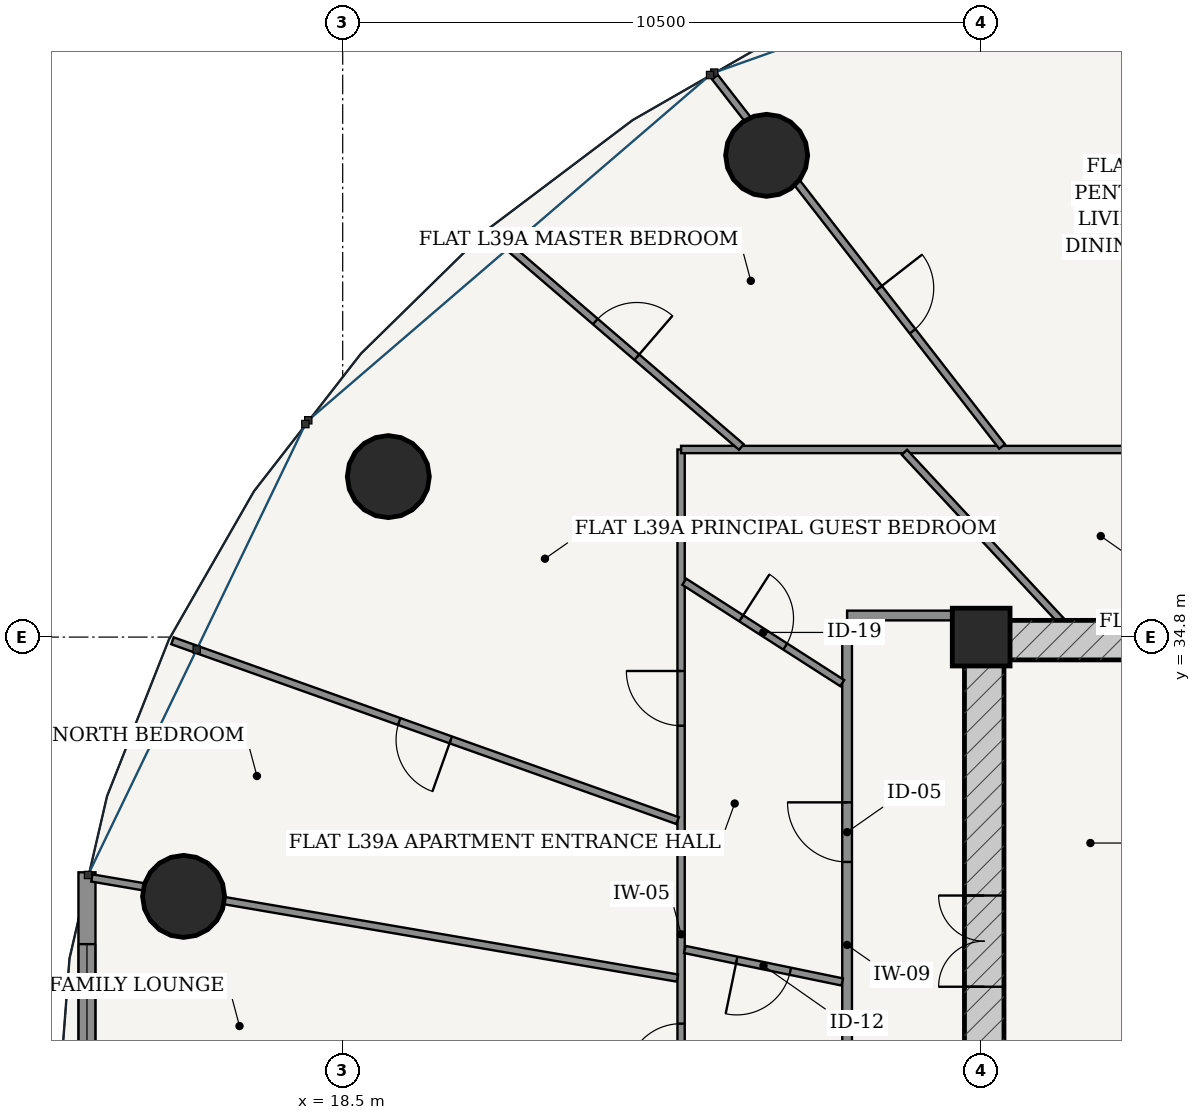
"""IFC4 building model, lengths in metres.
Left out: names, types, materials, properties, quantities, classifications, styles, units other than length and angle.
Written with IfcOpenShell. Run it as: python <this file> out.ifc"""

import sys

from ifc_helpers import new_model, si_unit, direction, frame, frame_2d, origin, origin_2d, place, context, subcontext, project, spatial, rectangle, hollow_circle, extrude, source, transform, mapped, element, fill, save


model = new_model("IFC4")
c1 = context("Model", 3, precision=1e-05, world=origin(), true_north=direction((-0.2419218956, 0.970295726276)))
c2 = subcontext(c1, "Body", "Model", "MODEL_VIEW")
j1 = project(units=[si_unit("LENGTHUNIT", "METRE"), si_unit("PLANEANGLEUNIT", "RADIAN")], contexts=[c1])
p1 = place(None, origin())
s1 = spatial("IfcSite", under=j1, at=p1, CompositionType="ELEMENT")
p2 = place(p1, origin())
s2 = spatial("IfcBuilding", under=s1, at=p2, CompositionType="ELEMENT")
p3 = place(p2, frame((0.0, 0.0, 149.8)))
s3 = spatial("IfcBuildingStorey", under=s2, at=p3, CompositionType="ELEMENT", Elevation=149.8)
p4 = place(p3, frame((29.0, 34.8, 0.0), z_axis=(0.0, 0.0, 1.0), x_axis=(1.0, 0.0, 0.0)))
e1 = element("IfcColumn", 1, at=p4, inside=s3, PredefinedType="COLUMN", context=c2, shape_type="SweptSolid", body=[
    extrude(rectangle(XDim=0.95, YDim=0.95, at=origin_2d()), origin(), (0.0, 0.0, 1.0), 3.6),
])
p5 = place(p3, frame((28.725, 34.75, 0.0), z_axis=(0.0, 0.0, 1.0), x_axis=(1.0, 0.0, 0.0)))
e2 = element("IfcWall", 2, at=p5, inside=s3, PredefinedType="SHEAR", context=c2, shape_type="SweptSolid", body=[
    extrude(rectangle(XDim=18.55, YDim=0.65, at=frame_2d((9.275, 0.0))), origin(), (0.0, 0.0, 1.0), 3.33),
])
p6 = place(p3, frame((29.05, 19.175, 0.0), z_axis=(0.0, 0.0, 1.0), x_axis=(0.0, 1.0, 0.0)))
e3 = element("IfcWall", 3, at=p6, inside=s3, PredefinedType="SHEAR", context=c2, shape_type="SweptSolid", body=[
    extrude(rectangle(XDim=15.25, YDim=0.65, at=frame_2d((7.625, 0.0))), origin(), (0.0, 0.0, 1.0), 3.33),
])
p7 = place(p6, frame((9.875, 0.0, 0.0)))
e4 = element("IfcOpeningElement", 4, at=p7, cuts=e3, PredefinedType="OPENING", context=c2, shape_type="SweptSolid", body=[
    extrude(rectangle(XDim=1.5, YDim=2.2, at=frame_2d((0.75, 1.1))), frame((0.0, 0.335, 0.0), z_axis=(0.0, -1.0, 0.0), x_axis=(1.0, 0.0, 0.0)), (0.0, 0.0, 1.0), 0.67),
])
for number, where, z_axis, x_axis in (
    (5, (25.472, 42.723, 0.0), (0.0, 0.0, 1.0), (1.0, 0.0, 0.0)),
    (6, (19.25, 37.439, 0.0), (0.0, 0.0, 1.0), (1.0, 0.0, 0.0)),
    (7, (15.883, 30.536, 0.0), (0.0, 0.0, 1.0), (1.0, 0.0, 0.0)),
):
    element("IfcColumn", number, at=place(p3, frame(where, z_axis=z_axis, x_axis=x_axis)), inside=s3, PredefinedType="COLUMN", context=c2, shape_type="SweptSolid", body=[
        extrude(hollow_circle(Radius=0.675, WallThickness=0.042, at=origin_2d()), origin(), (0.0, 0.0, 1.0), 3.6),
    ])
p8 = place(p3, frame((14.294, 30.932, 0.0), z_axis=(0.0, 0.0, 1.0), x_axis=(0.0, -1.0, 0.0)))
e8 = element("IfcWall", 8, at=p8, inside=s3, PredefinedType="SOLIDWALL", context=c2, shape_type="SweptSolid", body=[
    extrude(rectangle(XDim=8.264, YDim=0.28, at=frame_2d((4.132, 0.0))), origin(), (0.0, 0.0, 1.0), 3.33),
])
p9 = place(p8, frame((1.181, 0.0, 0.85)))
e9 = element("IfcOpeningElement", 9, at=p9, cuts=e8, PredefinedType="OPENING", context=c2, shape_type="SweptSolid", body=[
    extrude(rectangle(XDim=2.1, YDim=1.95, at=frame_2d((1.05, 0.975))), frame((0.0, 0.15, 0.0), z_axis=(0.0, -1.0, 0.0), x_axis=(1.0, 0.0, 0.0)), (0.0, 0.0, 1.0), 0.3),
])
p10 = place(p8, frame((4.983, 0.0, 0.85)))
e10 = element("IfcOpeningElement", 10, at=p10, cuts=e8, PredefinedType="OPENING", context=c2, shape_type="SweptSolid", body=[
    extrude(rectangle(XDim=2.1, YDim=1.95, at=frame_2d((1.05, 0.975))), frame((0.0, 0.15, 0.0), z_axis=(0.0, -1.0, 0.0), x_axis=(1.0, 0.0, 0.0)), (0.0, 0.0, 1.0), 0.3),
])
p11 = place(p3, frame((26.795, 24.4, 0.0), z_axis=(0.0, 0.0, 1.0), x_axis=(0.0, 1.0, 0.0)))
e11 = element("IfcWall", 11, at=p11, inside=s3, PredefinedType="PARTITIONING", context=c2, shape_type="SweptSolid", body=[
    extrude(rectangle(XDim=10.675, YDim=0.16, at=frame_2d((5.337, 0.0))), origin(), (0.0, 0.0, 1.0), 2.776),
])
p12 = place(p11, frame((6.702, 0.0, 0.0)))
e12 = element("IfcOpeningElement", 12, at=p12, cuts=e11, PredefinedType="OPENING", context=c2, shape_type="SweptSolid", body=[
    extrude(rectangle(XDim=0.98, YDim=2.2, at=frame_2d((0.49, 1.1))), frame((0.0, 0.09, 0.0), z_axis=(0.0, -1.0, 0.0), x_axis=(1.0, 0.0, 0.0)), (0.0, 0.0, 1.0), 0.18),
])
p13 = place(p3, frame((26.795, 35.155, 0.0), z_axis=(0.0, 0.0, 1.0), x_axis=(1.0, 0.0, 0.0)))
e13 = element("IfcWall", 13, at=p13, inside=s3, PredefinedType="PARTITIONING", context=c2, shape_type="SweptSolid", body=[
    extrude(rectangle(XDim=1.93, YDim=0.16, at=frame_2d((0.965, 0.0))), origin(), (0.0, 0.0, 1.0), 2.776),
])
p14 = place(p3, frame((24.065, 21.941, 0.0), z_axis=(0.0, 0.0, 1.0), x_axis=(0.0, 1.0, 0.0)))
e14 = element("IfcWall", 14, at=p14, inside=s3, PredefinedType="PARTITIONING", context=c2, shape_type="SweptSolid", body=[
    extrude(rectangle(XDim=15.944, YDim=0.12, at=frame_2d((7.972, 0.0))), origin(), (0.0, 0.0, 1.0), 2.776),
])
p15 = place(p14, frame((5.602, 0.0, 0.0)))
e15 = element("IfcOpeningElement", 15, at=p15, cuts=e14, PredefinedType="OPENING", context=c2, shape_type="SweptSolid", body=[
    extrude(rectangle(XDim=0.9, YDim=2.15, at=frame_2d((0.45, 1.075))), frame((0.0, 0.07, 0.0), z_axis=(0.0, -1.0, 0.0), x_axis=(1.0, 0.0, 0.0)), (0.0, 0.0, 1.0), 0.14),
])
p16 = place(p14, frame((1.707, 0.0, 0.0)))
e16 = element("IfcOpeningElement", 16, at=p16, cuts=e14, PredefinedType="OPENING", context=c2, shape_type="SweptSolid", body=[
    extrude(rectangle(XDim=0.9, YDim=2.15, at=frame_2d((0.45, 1.075))), frame((0.0, 0.07, 0.0), z_axis=(0.0, -1.0, 0.0), x_axis=(1.0, 0.0, 0.0)), (0.0, 0.0, 1.0), 0.14),
])
p17 = place(p14, frame((11.402, 0.0, 0.0)))
e17 = element("IfcOpeningElement", 17, at=p17, cuts=e14, PredefinedType="OPENING", context=c2, shape_type="SweptSolid", body=[
    extrude(rectangle(XDim=0.9, YDim=2.15, at=frame_2d((0.45, 1.075))), frame((0.0, 0.07, 0.0), z_axis=(0.0, -1.0, 0.0), x_axis=(1.0, 0.0, 0.0)), (0.0, 0.0, 1.0), 0.14),
])
p18 = place(p3, frame((24.065, 37.885, 0.0), z_axis=(0.0, 0.0, 1.0), x_axis=(1.0, 0.0, 0.0)))
e18 = element("IfcWall", 18, at=p18, inside=s3, PredefinedType="PARTITIONING", context=c2, shape_type="SweptSolid", body=[
    extrude(rectangle(XDim=7.47, YDim=0.12, at=frame_2d((3.735, 0.0))), origin(), (0.0, 0.0, 1.0), 2.776),
])
p19 = place(p3, frame((29.344, 37.934, 0.0), z_axis=(0.0, 0.0, 1.0), x_axis=(-0.613758289074, 0.789493991487, 0.0)))
e19 = element("IfcWall", 19, at=p19, inside=s3, PredefinedType="PARTITIONING", context=c2, shape_type="SweptSolid", body=[
    extrude(rectangle(XDim=7.695, YDim=0.12, at=frame_2d((3.848, 0.0))), origin(), (0.0, 0.0, 1.0), 2.776),
])
p20 = place(p19, frame((2.399, 0.0, 0.0)))
e20 = element("IfcOpeningElement", 20, at=p20, cuts=e19, PredefinedType="OPENING", context=c2, shape_type="SweptSolid", body=[
    extrude(rectangle(XDim=0.9, YDim=2.15, at=frame_2d((0.45, 1.075))), frame((0.0, 0.07, 0.0), z_axis=(0.0, -1.0, 0.0), x_axis=(1.0, 0.0, 0.0)), (0.0, 0.0, 1.0), 0.14),
])
p21 = place(p3, frame((25.056, 37.925, 0.0), z_axis=(0.0, 0.0, 1.0), x_axis=(-0.758354915574, 0.65184186888, 0.0)))
e21 = element("IfcWall", 21, at=p21, inside=s3, PredefinedType="PARTITIONING", context=c2, shape_type="SweptSolid", body=[
    extrude(rectangle(XDim=5.432, YDim=0.12, at=frame_2d((2.716, 0.0))), origin(), (0.0, 0.0, 1.0), 2.846),
])
p22 = place(p21, frame((2.266, 0.0, 0.0)))
e22 = element("IfcOpeningElement", 22, at=p22, cuts=e21, PredefinedType="OPENING", context=c2, shape_type="SweptSolid", body=[
    extrude(rectangle(XDim=0.9, YDim=2.15, at=frame_2d((0.45, 1.075))), frame((0.0, 0.07, 0.0), z_axis=(0.0, -1.0, 0.0), x_axis=(1.0, 0.0, 0.0)), (0.0, 0.0, 1.0), 0.14),
])
p23 = place(p3, frame((24.007, 31.782, 0.0), z_axis=(0.0, 0.0, 1.0), x_axis=(-0.942077868165, 0.335394231187, 0.0)))
e23 = element("IfcWall", 23, at=p23, inside=s3, PredefinedType="PARTITIONING", context=c2, shape_type="SweptSolid", body=[
    extrude(rectangle(XDim=8.817, YDim=0.12, at=frame_2d((4.408, 0.0))), origin(), (0.0, 0.0, 1.0), 2.846),
])
p24 = place(p23, frame((3.958, 0.0, 0.0)))
e24 = element("IfcOpeningElement", 24, at=p24, cuts=e23, PredefinedType="OPENING", context=c2, shape_type="SweptSolid", body=[
    extrude(rectangle(XDim=0.9, YDim=2.15, at=frame_2d((0.45, 1.075))), frame((0.0, 0.07, 0.0), z_axis=(0.0, -1.0, 0.0), x_axis=(1.0, 0.0, 0.0)), (0.0, 0.0, 1.0), 0.14),
])
p25 = place(p3, frame((24.004, 29.193, 0.0), z_axis=(0.0, 0.0, 1.0), x_axis=(-0.985698378271, 0.168519159369, 0.0)))
e25 = element("IfcWall", 25, at=p25, inside=s3, PredefinedType="PARTITIONING", context=c2, shape_type="SweptSolid", body=[
    extrude(rectangle(XDim=9.769, YDim=0.12, at=frame_2d((4.884, 0.0))), origin(), (0.0, 0.0, 1.0), 2.776),
])
p26 = place(p3, frame((30.307, 35.075, 0.0), z_axis=(0.0, 0.0, 1.0), x_axis=(-0.68082810609, 0.732443233267, 0.0)))
e26 = element("IfcWall", 26, at=p26, inside=s3, PredefinedType="PARTITIONING", context=c2, shape_type="SweptSolid", body=[
    extrude(rectangle(XDim=3.775, YDim=0.12, at=frame_2d((1.887, 0.0))), origin(), (0.0, 0.0, 1.0), 2.776),
])
p27 = place(p3, frame((26.715, 34.043, 0.0), z_axis=(0.0, 0.0, 1.0), x_axis=(-0.841597086151, 0.540105864235, 0.0)))
e27 = element("IfcWall", 27, at=p27, inside=s3, PredefinedType="PARTITIONING", context=c2, shape_type="SweptSolid", body=[
    extrude(rectangle(XDim=3.087, YDim=0.12, at=frame_2d((1.543, 0.0))), origin(), (0.0, 0.0, 1.0), 3.005),
])
p28 = place(p27, frame((1.113, 0.0, 0.0)))
e28 = element("IfcOpeningElement", 28, at=p28, cuts=e27, PredefinedType="OPENING", context=c2, shape_type="SweptSolid", body=[
    extrude(rectangle(XDim=0.86, YDim=2.15, at=frame_2d((0.43, 1.075))), frame((0.0, 0.07, 0.0), z_axis=(0.0, -1.0, 0.0), x_axis=(1.0, 0.0, 0.0)), (0.0, 0.0, 1.0), 0.14),
])
p29 = place(p3, frame((26.715, 29.129, 0.0), z_axis=(0.0, 0.0, 1.0), x_axis=(-0.979376501526, 0.202043728582, 0.0)))
e29 = element("IfcWall", 29, at=p29, inside=s3, PredefinedType="PARTITIONING", context=c2, shape_type="SweptSolid", body=[
    extrude(rectangle(XDim=2.644, YDim=0.12, at=frame_2d((1.322, 0.0))), origin(), (0.0, 0.0, 1.0), 3.33),
])
p30 = place(p29, frame((0.872, 0.0, 0.0)))
e30 = element("IfcOpeningElement", 30, at=p30, cuts=e29, PredefinedType="OPENING", context=c2, shape_type="SweptSolid", body=[
    extrude(rectangle(XDim=0.9, YDim=2.15, at=frame_2d((0.45, 1.075))), frame((0.0, 0.07, 0.0), z_axis=(0.0, -1.0, 0.0), x_axis=(1.0, 0.0, 0.0)), (0.0, 0.0, 1.0), 0.14),
])
m1 = source(origin(), c2, "Body", "SweptSolid", [
    extrude(rectangle(XDim=2.1, YDim=1.95, at=frame_2d((1.05, 0.975))), frame((0.0, 0.03, 0.0), z_axis=(0.0, -1.0, 0.0), x_axis=(1.0, 0.0, 0.0)), (0.0, 0.0, 1.0), 0.06),
])
p31 = place(p9, origin())
e31 = element("IfcWindow", 31, at=p31, inside=s3, PartitioningType="SINGLE_PANEL", PredefinedType="WINDOW", context=c2, shape_type="MappedRepresentation", body=[
    mapped(m1, transform((0.0, 0.0, 0.0), scale=1.0)),
])
fill(e9, e31)
m2 = source(origin(), c2, "Body", "SweptSolid", [
    extrude(rectangle(XDim=1.5, YDim=2.2, at=frame_2d((0.75, 1.1))), frame((0.0, 0.025, 0.0), z_axis=(0.0, -1.0, 0.0), x_axis=(1.0, 0.0, 0.0)), (0.0, 0.0, 1.0), 0.05),
])
p32 = place(p7, origin())
e32 = element("IfcDoor", 32, at=p32, inside=s3, OperationType="DOUBLE_DOOR_SINGLE_SWING", PredefinedType="DOOR", context=c2, shape_type="MappedRepresentation", body=[
    mapped(m2, transform((0.0, 0.0, 0.0), scale=1.0)),
])
fill(e4, e32)
m3 = source(origin(), c2, "Body", "SweptSolid", [
    extrude(rectangle(XDim=0.98, YDim=2.2, at=frame_2d((0.49, 1.1))), frame((0.0, 0.025, 0.0), z_axis=(0.0, -1.0, 0.0), x_axis=(1.0, 0.0, 0.0)), (0.0, 0.0, 1.0), 0.05),
])
p33 = place(p12, origin())
e33 = element("IfcDoor", 33, at=p33, inside=s3, OperationType="SINGLE_SWING_RIGHT", PredefinedType="DOOR", context=c2, shape_type="MappedRepresentation", body=[
    mapped(m3, transform((0.0, 0.0, 0.0), scale=1.0)),
])
fill(e12, e33)
m4 = source(origin(), c2, "Body", "SweptSolid", [
    extrude(rectangle(XDim=0.86, YDim=2.15, at=frame_2d((0.43, 1.075))), frame((0.0, 0.025, 0.0), z_axis=(0.0, -1.0, 0.0), x_axis=(1.0, 0.0, 0.0)), (0.0, 0.0, 1.0), 0.05),
])
p34 = place(p28, frame((0.86, 0.0, 0.0), z_axis=(0.0, 0.0, 1.0), x_axis=(-1.0, 0.0, 0.0)))
e34 = element("IfcDoor", 34, at=p34, inside=s3, OperationType="SINGLE_SWING_LEFT", PredefinedType="DOOR", context=c2, shape_type="MappedRepresentation", body=[
    mapped(m4, transform((0.0, 0.0, 0.0), scale=1.0)),
])
fill(e28, e34)
m5 = source(origin(), c2, "Body", "SweptSolid", [
    extrude(rectangle(XDim=0.9, YDim=2.15, at=frame_2d((0.45, 1.075))), frame((0.0, 0.025, 0.0), z_axis=(0.0, -1.0, 0.0), x_axis=(1.0, 0.0, 0.0)), (0.0, 0.0, 1.0), 0.05),
])
p35 = place(p30, origin())
e35 = element("IfcDoor", 35, at=p35, inside=s3, OperationType="SINGLE_SWING_RIGHT", PredefinedType="DOOR", context=c2, shape_type="MappedRepresentation", body=[
    mapped(m5, transform((0.0, 0.0, 0.0), scale=1.0)),
])
fill(e30, e35)
p36 = place(p15, origin())
e36 = element("IfcDoor", 36, at=p36, inside=s3, OperationType="SINGLE_SWING_LEFT", PredefinedType="DOOR", context=c2, shape_type="MappedRepresentation", body=[
    mapped(m5, transform((0.0, 0.0, 0.0), scale=1.0)),
])
fill(e15, e36)
p37 = place(p17, origin())
e37 = element("IfcDoor", 37, at=p37, inside=s3, OperationType="SINGLE_SWING_RIGHT", PredefinedType="DOOR", context=c2, shape_type="MappedRepresentation", body=[
    mapped(m5, transform((0.0, 0.0, 0.0), scale=1.0)),
])
fill(e17, e37)
p38 = place(p24, origin())
e38 = element("IfcDoor", 38, at=p38, inside=s3, OperationType="SINGLE_SWING_LEFT", PredefinedType="DOOR", context=c2, shape_type="MappedRepresentation", body=[
    mapped(m5, transform((0.0, 0.0, 0.0), scale=1.0)),
])
fill(e24, e38)
p39 = place(p22, frame((0.9, 0.0, 0.0), z_axis=(0.0, 0.0, 1.0), x_axis=(-1.0, 0.0, 0.0)))
e39 = element("IfcDoor", 39, at=p39, inside=s3, OperationType="SINGLE_SWING_RIGHT", PredefinedType="DOOR", context=c2, shape_type="MappedRepresentation", body=[
    mapped(m5, transform((0.0, 0.0, 0.0), scale=1.0)),
])
fill(e22, e39)
p40 = place(p20, frame((0.9, 0.0, 0.0), z_axis=(0.0, 0.0, 1.0), x_axis=(-1.0, 0.0, 0.0)))
e40 = element("IfcDoor", 40, at=p40, inside=s3, OperationType="SINGLE_SWING_LEFT", PredefinedType="DOOR", context=c2, shape_type="MappedRepresentation", body=[
    mapped(m5, transform((0.0, 0.0, 0.0), scale=1.0)),
])
fill(e20, e40)
save(model, sys.argv[1])
